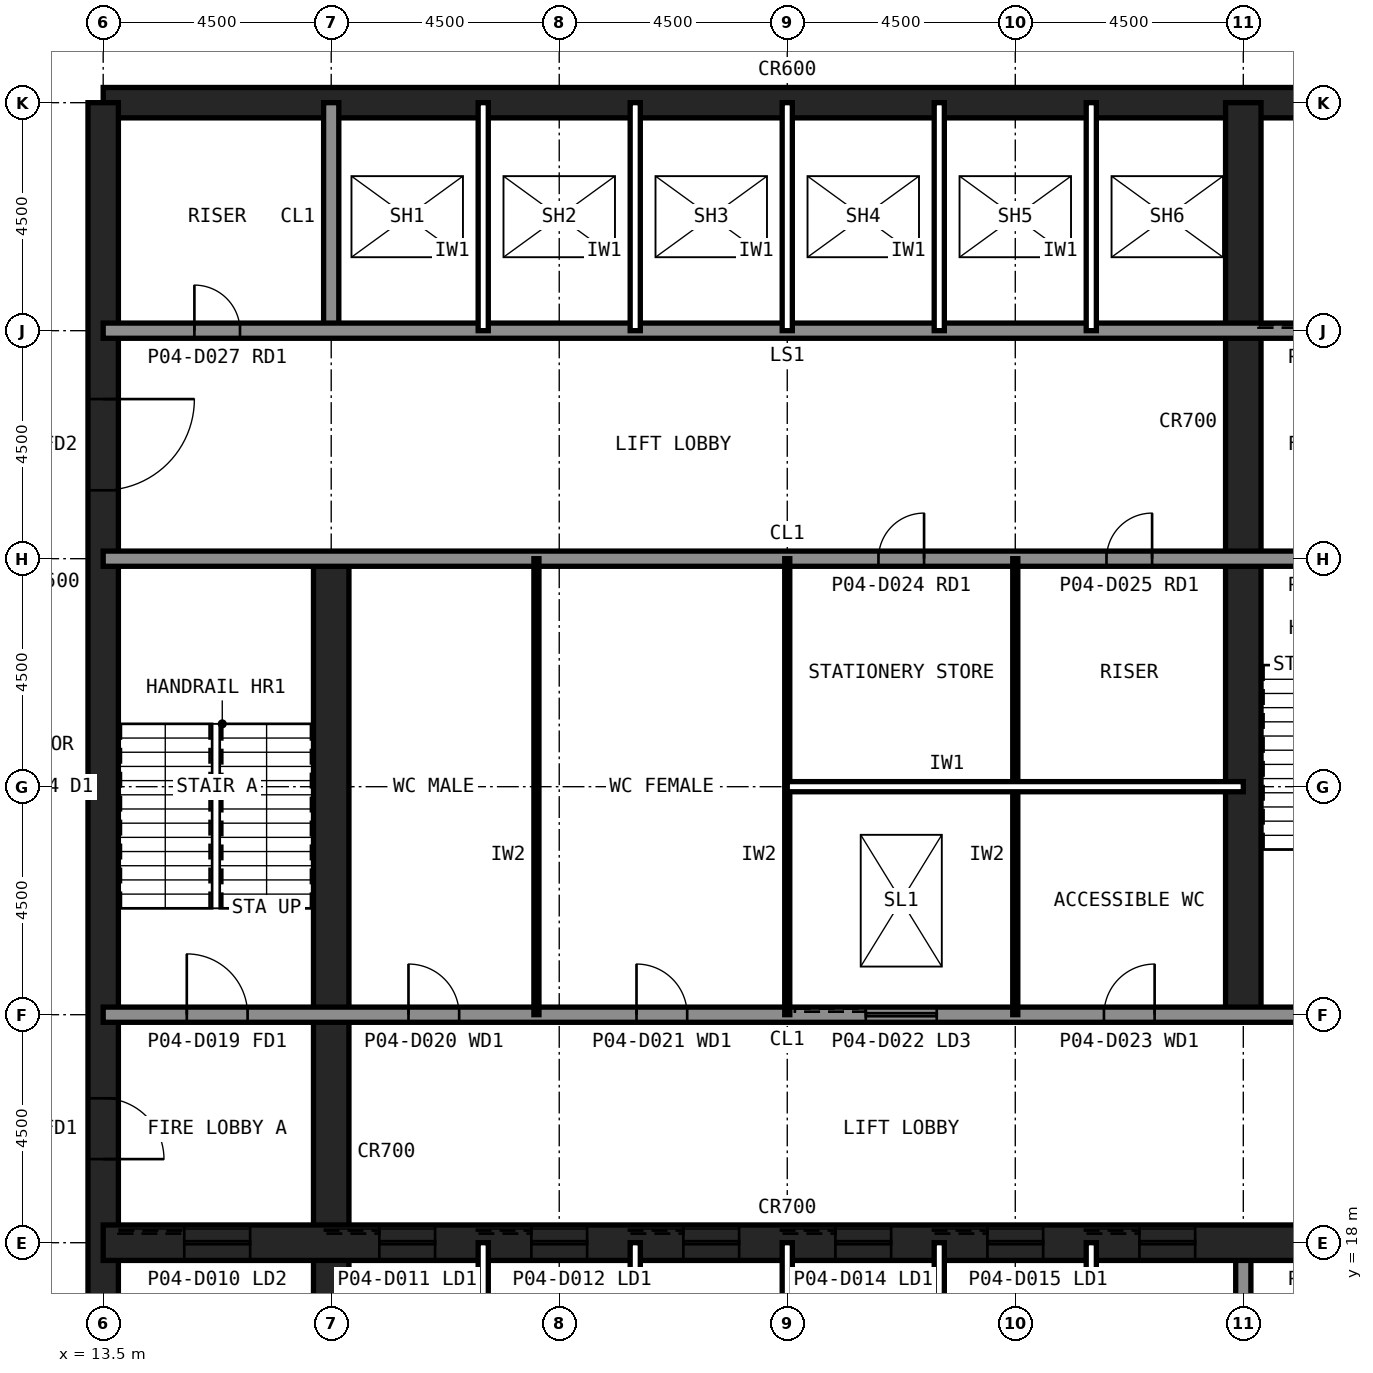
"""IFC4 building model, lengths in metres.
Left out: names, types, materials, properties, quantities, classifications, styles, units other than length and angle.
Written with IfcOpenShell. Run it as: python <this file> out.ifc"""

import sys

from ifc_helpers import new_model, si_unit, direction, frame, frame_2d, origin, place, context, subcontext, project, spatial, rectangle, extrude, element, fill, save


model = new_model("IFC4")
c1 = context("Model", 3, precision=1e-05, world=origin(), true_north=direction((0.0, 1.0)))
c2 = subcontext(c1, "Body", "Model", "MODEL_VIEW")
j1 = project(units=[si_unit("LENGTHUNIT", "METRE"), si_unit("PLANEANGLEUNIT", "RADIAN")], contexts=[c1])
p1 = place(None, origin())
s1 = spatial("IfcSite", under=j1, at=p1, CompositionType="ELEMENT")
p2 = place(p1, origin())
s2 = spatial("IfcBuilding", under=s1, at=p2, CompositionType="ELEMENT")
p3 = place(p2, frame((0.0, 0.0, 18.0)))
s3 = spatial("IfcBuildingStorey", under=s2, at=p3, CompositionType="ELEMENT", Elevation=18.0)
p4 = place(p3, frame((40.5, 40.5, 0.0), z_axis=(0.0, 0.0, 1.0), x_axis=(-1.0, 0.0, 0.0)))
e1 = element("IfcWall", 1, at=p4, inside=s3, PredefinedType="SHEAR", context=c2, shape_type="SweptSolid", body=[
    extrude(rectangle(XDim=27.0, YDim=0.6, at=frame_2d((13.5, 0.0))), origin(), (0.0, 0.0, 1.0), 5.0),
])
p5 = place(p3, frame((13.5, 40.5, 0.0), z_axis=(0.0, 0.0, 1.0), x_axis=(0.0, -1.0, 0.0)))
e2 = element("IfcWall", 2, at=p5, inside=s3, PredefinedType="SHEAR", context=c2, shape_type="SweptSolid", body=[
    extrude(rectangle(XDim=27.0, YDim=0.6, at=frame_2d((13.5, 0.0))), origin(), (0.0, 0.0, 1.0), 5.0),
])
p6 = place(p5, frame((19.65, 0.0, 0.0)))
e3 = element("IfcOpeningElement", 3, at=p6, cuts=e2, PredefinedType="OPENING", context=c2, shape_type="SweptSolid", body=[
    extrude(rectangle(XDim=1.2, YDim=2.1, at=frame_2d((0.6, 1.05))), frame((0.0, 0.31, 0.0), z_axis=(0.0, -1.0, 0.0), x_axis=(1.0, 0.0, 0.0)), (0.0, 0.0, 1.0), 0.62),
])
p7 = place(p5, frame((5.85, 0.0, 0.0)))
e4 = element("IfcOpeningElement", 4, at=p7, cuts=e2, PredefinedType="OPENING", context=c2, shape_type="SweptSolid", body=[
    extrude(rectangle(XDim=1.8, YDim=2.1, at=frame_2d((0.9, 1.05))), frame((0.0, 0.31, 0.0), z_axis=(0.0, -1.0, 0.0), x_axis=(1.0, 0.0, 0.0)), (0.0, 0.0, 1.0), 0.62),
])
p8 = place(p3, frame((18.0, 13.5, 0.0), z_axis=(0.0, 0.0, 1.0), x_axis=(0.0, 1.0, 0.0)))
e5 = element("IfcWall", 5, at=p8, inside=s3, PredefinedType="SHEAR", context=c2, shape_type="SweptSolid", body=[
    extrude(rectangle(XDim=18.0, YDim=0.7, at=frame_2d((9.0, 0.0))), origin(), (0.0, 0.0, 1.0), 5.0),
])
for number, where, z_axis, x_axis in (
    (6, (18.0, 36.0, 0.0), (0.0, 0.0, 1.0), (0.0, 1.0, 0.0)),
    (7, (36.0, 13.5, 0.0), (0.0, 0.0, 1.0), (0.0, 1.0, 0.0)),
):
    element("IfcWall", number, at=place(p3, frame(where, z_axis=z_axis, x_axis=x_axis)), inside=s3, PredefinedType="SOLIDWALL", context=c2, shape_type="SweptSolid", body=[
        extrude(rectangle(XDim=4.5, YDim=0.3, at=frame_2d((2.25, 0.0))), origin(), (0.0, 0.0, 1.0), 4.8),
    ])
p9 = place(p3, frame((36.0, 22.5, 0.0), z_axis=(0.0, 0.0, 1.0), x_axis=(0.0, 1.0, 0.0)))
e8 = element("IfcWall", 8, at=p9, inside=s3, PredefinedType="SHEAR", context=c2, shape_type="SweptSolid", body=[
    extrude(rectangle(XDim=18.0, YDim=0.7, at=frame_2d((9.0, 0.0))), origin(), (0.0, 0.0, 1.0), 5.0),
])
p10 = place(p3, frame((13.5, 18.0, 0.0), z_axis=(0.0, 0.0, 1.0), x_axis=(1.0, 0.0, 0.0)))
e9 = element("IfcWall", 9, at=p10, inside=s3, PredefinedType="SHEAR", context=c2, shape_type="SweptSolid", body=[
    extrude(rectangle(XDim=27.0, YDim=0.7, at=frame_2d((13.5, 0.0))), origin(), (0.0, 0.0, 1.0), 5.0),
])
p11 = place(p10, frame((24.3, 0.0, 0.0)))
e10 = element("IfcOpeningElement", 10, at=p11, cuts=e9, PredefinedType="OPENING", context=c2, shape_type="SweptSolid", body=[
    extrude(rectangle(XDim=0.9, YDim=2.1, at=frame_2d((0.45, 1.05))), frame((0.0, 0.36, 0.0), z_axis=(0.0, -1.0, 0.0), x_axis=(1.0, 0.0, 0.0)), (0.0, 0.0, 1.0), 0.72),
])
p12 = place(p10, frame((5.45, 0.0, 0.0)))
e11 = element("IfcOpeningElement", 11, at=p12, cuts=e9, PredefinedType="OPENING", context=c2, shape_type="SweptSolid", body=[
    extrude(rectangle(XDim=1.1, YDim=2.1, at=frame_2d((0.55, 1.05))), frame((0.0, 0.36, 0.0), z_axis=(0.0, -1.0, 0.0), x_axis=(1.0, 0.0, 0.0)), (0.0, 0.0, 1.0), 0.72),
])
p13 = place(p10, frame((8.45, 0.0, 0.0)))
e12 = element("IfcOpeningElement", 12, at=p13, cuts=e9, PredefinedType="OPENING", context=c2, shape_type="SweptSolid", body=[
    extrude(rectangle(XDim=1.1, YDim=2.1, at=frame_2d((0.55, 1.05))), frame((0.0, 0.36, 0.0), z_axis=(0.0, -1.0, 0.0), x_axis=(1.0, 0.0, 0.0)), (0.0, 0.0, 1.0), 0.72),
])
p14 = place(p10, frame((11.45, 0.0, 0.0)))
e13 = element("IfcOpeningElement", 13, at=p14, cuts=e9, PredefinedType="OPENING", context=c2, shape_type="SweptSolid", body=[
    extrude(rectangle(XDim=1.1, YDim=2.1, at=frame_2d((0.55, 1.05))), frame((0.0, 0.36, 0.0), z_axis=(0.0, -1.0, 0.0), x_axis=(1.0, 0.0, 0.0)), (0.0, 0.0, 1.0), 0.72),
])
p15 = place(p10, frame((14.45, 0.0, 0.0)))
e14 = element("IfcOpeningElement", 14, at=p15, cuts=e9, PredefinedType="OPENING", context=c2, shape_type="SweptSolid", body=[
    extrude(rectangle(XDim=1.1, YDim=2.1, at=frame_2d((0.55, 1.05))), frame((0.0, 0.36, 0.0), z_axis=(0.0, -1.0, 0.0), x_axis=(1.0, 0.0, 0.0)), (0.0, 0.0, 1.0), 0.72),
])
p16 = place(p10, frame((17.45, 0.0, 0.0)))
e15 = element("IfcOpeningElement", 15, at=p16, cuts=e9, PredefinedType="OPENING", context=c2, shape_type="SweptSolid", body=[
    extrude(rectangle(XDim=1.1, YDim=2.1, at=frame_2d((0.55, 1.05))), frame((0.0, 0.36, 0.0), z_axis=(0.0, -1.0, 0.0), x_axis=(1.0, 0.0, 0.0)), (0.0, 0.0, 1.0), 0.72),
])
p17 = place(p10, frame((20.45, 0.0, 0.0)))
e16 = element("IfcOpeningElement", 16, at=p17, cuts=e9, PredefinedType="OPENING", context=c2, shape_type="SweptSolid", body=[
    extrude(rectangle(XDim=1.1, YDim=2.1, at=frame_2d((0.55, 1.05))), frame((0.0, 0.36, 0.0), z_axis=(0.0, -1.0, 0.0), x_axis=(1.0, 0.0, 0.0)), (0.0, 0.0, 1.0), 0.72),
])
p18 = place(p10, frame((1.6, 0.0, 0.0)))
e17 = element("IfcOpeningElement", 17, at=p18, cuts=e9, PredefinedType="OPENING", context=c2, shape_type="SweptSolid", body=[
    extrude(rectangle(XDim=1.3, YDim=2.2, at=frame_2d((0.65, 1.1))), frame((0.0, 0.36, 0.0), z_axis=(0.0, -1.0, 0.0), x_axis=(1.0, 0.0, 0.0)), (0.0, 0.0, 1.0), 0.72),
])
p19 = place(p3, frame((13.5, 36.0, 0.0), z_axis=(0.0, 0.0, 1.0), x_axis=(1.0, 0.0, 0.0)))
e18 = element("IfcWall", 18, at=p19, inside=s3, PredefinedType="SOLIDWALL", context=c2, shape_type="SweptSolid", body=[
    extrude(rectangle(XDim=27.0, YDim=0.3, at=frame_2d((13.5, 0.0))), origin(), (0.0, 0.0, 1.0), 4.8),
])
p20 = place(p19, frame((1.8, 0.0, 0.0)))
e19 = element("IfcOpeningElement", 19, at=p20, cuts=e18, PredefinedType="OPENING", context=c2, shape_type="SweptSolid", body=[
    extrude(rectangle(XDim=0.9, YDim=2.1, at=frame_2d((0.45, 1.05))), frame((0.0, 0.16, 0.0), z_axis=(0.0, -1.0, 0.0), x_axis=(1.0, 0.0, 0.0)), (0.0, 0.0, 1.0), 0.32),
])
p21 = place(p19, frame((24.1, 0.0, 0.0)))
e20 = element("IfcOpeningElement", 20, at=p21, cuts=e18, PredefinedType="OPENING", context=c2, shape_type="SweptSolid", body=[
    extrude(rectangle(XDim=1.3, YDim=2.2, at=frame_2d((0.65, 1.1))), frame((0.0, 0.16, 0.0), z_axis=(0.0, -1.0, 0.0), x_axis=(1.0, 0.0, 0.0)), (0.0, 0.0, 1.0), 0.32),
])
p22 = place(p3, frame((13.5, 22.5, 0.0), z_axis=(0.0, 0.0, 1.0), x_axis=(1.0, 0.0, 0.0)))
e21 = element("IfcWall", 21, at=p22, inside=s3, PredefinedType="SOLIDWALL", context=c2, shape_type="SweptSolid", body=[
    extrude(rectangle(XDim=27.0, YDim=0.3, at=frame_2d((13.5, 0.0))), origin(), (0.0, 0.0, 1.0), 4.8),
])
p23 = place(p22, frame((1.65, 0.0, 0.0)))
e22 = element("IfcOpeningElement", 22, at=p23, cuts=e21, PredefinedType="OPENING", context=c2, shape_type="SweptSolid", body=[
    extrude(rectangle(XDim=1.2, YDim=2.1, at=frame_2d((0.6, 1.05))), frame((0.0, 0.16, 0.0), z_axis=(0.0, -1.0, 0.0), x_axis=(1.0, 0.0, 0.0)), (0.0, 0.0, 1.0), 0.32),
])
p24 = place(p22, frame((6.025, 0.0, 0.0)))
e23 = element("IfcOpeningElement", 23, at=p24, cuts=e21, PredefinedType="OPENING", context=c2, shape_type="SweptSolid", body=[
    extrude(rectangle(XDim=1.0, YDim=2.1, at=frame_2d((0.5, 1.05))), frame((0.0, 0.16, 0.0), z_axis=(0.0, -1.0, 0.0), x_axis=(1.0, 0.0, 0.0)), (0.0, 0.0, 1.0), 0.32),
])
p25 = place(p22, frame((10.525, 0.0, 0.0)))
e24 = element("IfcOpeningElement", 24, at=p25, cuts=e21, PredefinedType="OPENING", context=c2, shape_type="SweptSolid", body=[
    extrude(rectangle(XDim=1.0, YDim=2.1, at=frame_2d((0.5, 1.05))), frame((0.0, 0.16, 0.0), z_axis=(0.0, -1.0, 0.0), x_axis=(1.0, 0.0, 0.0)), (0.0, 0.0, 1.0), 0.32),
])
p26 = place(p22, frame((19.75, 0.0, 0.0)))
e25 = element("IfcOpeningElement", 25, at=p26, cuts=e21, PredefinedType="OPENING", context=c2, shape_type="SweptSolid", body=[
    extrude(rectangle(XDim=1.0, YDim=2.1, at=frame_2d((0.5, 1.05))), frame((0.0, 0.16, 0.0), z_axis=(0.0, -1.0, 0.0), x_axis=(1.0, 0.0, 0.0)), (0.0, 0.0, 1.0), 0.32),
])
p27 = place(p22, frame((15.05, 0.0, 0.0)))
e26 = element("IfcOpeningElement", 26, at=p27, cuts=e21, PredefinedType="OPENING", context=c2, shape_type="SweptSolid", body=[
    extrude(rectangle(XDim=1.4, YDim=2.4, at=frame_2d((0.7, 1.2))), frame((0.0, 0.16, 0.0), z_axis=(0.0, -1.0, 0.0), x_axis=(1.0, 0.0, 0.0)), (0.0, 0.0, 1.0), 0.32),
])
p28 = place(p3, frame((13.5, 31.5, 0.0), z_axis=(0.0, 0.0, 1.0), x_axis=(1.0, 0.0, 0.0)))
e27 = element("IfcWall", 27, at=p28, inside=s3, PredefinedType="SOLIDWALL", context=c2, shape_type="SweptSolid", body=[
    extrude(rectangle(XDim=27.0, YDim=0.3, at=frame_2d((13.5, 0.0))), origin(), (0.0, 0.0, 1.0), 4.8),
])
p29 = place(p28, frame((24.15, 0.0, 0.0)))
e28 = element("IfcOpeningElement", 28, at=p29, cuts=e27, PredefinedType="OPENING", context=c2, shape_type="SweptSolid", body=[
    extrude(rectangle(XDim=1.2, YDim=2.1, at=frame_2d((0.6, 1.05))), frame((0.0, 0.16, 0.0), z_axis=(0.0, -1.0, 0.0), x_axis=(1.0, 0.0, 0.0)), (0.0, 0.0, 1.0), 0.32),
])
p30 = place(p28, frame((15.3, 0.0, 0.0)))
e29 = element("IfcOpeningElement", 29, at=p30, cuts=e27, PredefinedType="OPENING", context=c2, shape_type="SweptSolid", body=[
    extrude(rectangle(XDim=0.9, YDim=2.1, at=frame_2d((0.45, 1.05))), frame((0.0, 0.16, 0.0), z_axis=(0.0, -1.0, 0.0), x_axis=(1.0, 0.0, 0.0)), (0.0, 0.0, 1.0), 0.32),
])
p31 = place(p28, frame((19.8, 0.0, 0.0)))
e30 = element("IfcOpeningElement", 30, at=p31, cuts=e27, PredefinedType="OPENING", context=c2, shape_type="SweptSolid", body=[
    extrude(rectangle(XDim=0.9, YDim=2.1, at=frame_2d((0.45, 1.05))), frame((0.0, 0.16, 0.0), z_axis=(0.0, -1.0, 0.0), x_axis=(1.0, 0.0, 0.0)), (0.0, 0.0, 1.0), 0.32),
])
for number, where, z_axis, x_axis in (
    (31, (21.0, 13.5, 0.0), (0.0, 0.0, 1.0), (0.0, 1.0, 0.0)),
    (32, (21.0, 36.0, 0.0), (0.0, 0.0, 1.0), (0.0, 1.0, 0.0)),
    (33, (24.0, 13.5, 0.0), (0.0, 0.0, 1.0), (0.0, 1.0, 0.0)),
    (34, (24.0, 36.0, 0.0), (0.0, 0.0, 1.0), (0.0, 1.0, 0.0)),
    (35, (27.0, 13.5, 0.0), (0.0, 0.0, 1.0), (0.0, 1.0, 0.0)),
    (36, (27.0, 36.0, 0.0), (0.0, 0.0, 1.0), (0.0, 1.0, 0.0)),
    (37, (30.0, 13.5, 0.0), (0.0, 0.0, 1.0), (0.0, 1.0, 0.0)),
    (38, (30.0, 36.0, 0.0), (0.0, 0.0, 1.0), (0.0, 1.0, 0.0)),
    (39, (33.0, 13.5, 0.0), (0.0, 0.0, 1.0), (0.0, 1.0, 0.0)),
    (40, (33.0, 36.0, 0.0), (0.0, 0.0, 1.0), (0.0, 1.0, 0.0)),
):
    element("IfcWall", number, at=place(p3, frame(where, z_axis=z_axis, x_axis=x_axis)), inside=s3, PredefinedType="PARTITIONING", context=c2, shape_type="SweptSolid", body=[
        extrude(rectangle(XDim=4.5, YDim=0.2, at=frame_2d((2.25, 0.0))), origin(), (0.0, 0.0, 1.0), 4.8),
    ])
for number, where, z_axis, x_axis in (
    (41, (22.05, 22.5, 0.0), (0.0, 0.0, 1.0), (0.0, 1.0, 0.0)),
    (42, (27.0, 22.5, 0.0), (0.0, 0.0, 1.0), (0.0, 1.0, 0.0)),
    (43, (31.5, 22.5, 0.0), (0.0, 0.0, 1.0), (0.0, 1.0, 0.0)),
):
    element("IfcWall", number, at=place(p3, frame(where, z_axis=z_axis, x_axis=x_axis)), inside=s3, PredefinedType="PLUMBINGWALL", context=c2, shape_type="SweptSolid", body=[
        extrude(rectangle(XDim=9.0, YDim=0.1, at=frame_2d((4.5, 0.0))), origin(), (0.0, 0.0, 1.0), 4.8),
    ])
p32 = place(p3, frame((27.0, 27.0, 0.0), z_axis=(0.0, 0.0, 1.0), x_axis=(1.0, 0.0, 0.0)))
e44 = element("IfcWall", 44, at=p32, inside=s3, PredefinedType="PARTITIONING", context=c2, shape_type="SweptSolid", body=[
    extrude(rectangle(XDim=9.0, YDim=0.2, at=frame_2d((4.5, 0.0))), origin(), (0.0, 0.0, 1.0), 4.8),
])
p33 = place(p6, origin())
e45 = element("IfcDoor", 45, at=p33, inside=s3, OperationType="SINGLE_SWING_RIGHT", PredefinedType="DOOR", context=c2, shape_type="SweptSolid", body=[
    extrude(rectangle(XDim=1.2, YDim=2.1, at=frame_2d((0.6, 1.05))), frame((0.0, 0.025, 0.0), z_axis=(0.0, -1.0, 0.0), x_axis=(1.0, 0.0, 0.0)), (0.0, 0.0, 1.0), 0.05),
])
fill(e3, e45)
p34 = place(p7, origin())
e46 = element("IfcDoor", 46, at=p34, inside=s3, OperationType="SINGLE_SWING_LEFT", PredefinedType="DOOR", context=c2, shape_type="SweptSolid", body=[
    extrude(rectangle(XDim=1.8, YDim=2.1, at=frame_2d((0.9, 1.05))), frame((0.0, 0.025, 0.0), z_axis=(0.0, -1.0, 0.0), x_axis=(1.0, 0.0, 0.0)), (0.0, 0.0, 1.0), 0.05),
])
fill(e4, e46)
p35 = place(p23, origin())
e47 = element("IfcDoor", 47, at=p35, inside=s3, OperationType="SINGLE_SWING_LEFT", PredefinedType="DOOR", context=c2, shape_type="SweptSolid", body=[
    extrude(rectangle(XDim=1.2, YDim=2.1, at=frame_2d((0.6, 1.05))), frame((0.0, 0.025, 0.0), z_axis=(0.0, -1.0, 0.0), x_axis=(1.0, 0.0, 0.0)), (0.0, 0.0, 1.0), 0.05),
])
fill(e22, e47)
p36 = place(p24, origin())
e48 = element("IfcDoor", 48, at=p36, inside=s3, OperationType="SINGLE_SWING_LEFT", PredefinedType="DOOR", context=c2, shape_type="SweptSolid", body=[
    extrude(rectangle(XDim=1.0, YDim=2.1, at=frame_2d((0.5, 1.05))), frame((0.0, 0.025, 0.0), z_axis=(0.0, -1.0, 0.0), x_axis=(1.0, 0.0, 0.0)), (0.0, 0.0, 1.0), 0.05),
])
fill(e23, e48)
p37 = place(p25, origin())
e49 = element("IfcDoor", 49, at=p37, inside=s3, OperationType="SINGLE_SWING_LEFT", PredefinedType="DOOR", context=c2, shape_type="SweptSolid", body=[
    extrude(rectangle(XDim=1.0, YDim=2.1, at=frame_2d((0.5, 1.05))), frame((0.0, 0.025, 0.0), z_axis=(0.0, -1.0, 0.0), x_axis=(1.0, 0.0, 0.0)), (0.0, 0.0, 1.0), 0.05),
])
fill(e24, e49)
p38 = place(p26, origin())
e50 = element("IfcDoor", 50, at=p38, inside=s3, OperationType="SINGLE_SWING_RIGHT", PredefinedType="DOOR", context=c2, shape_type="SweptSolid", body=[
    extrude(rectangle(XDim=1.0, YDim=2.1, at=frame_2d((0.5, 1.05))), frame((0.0, 0.025, 0.0), z_axis=(0.0, -1.0, 0.0), x_axis=(1.0, 0.0, 0.0)), (0.0, 0.0, 1.0), 0.05),
])
fill(e25, e50)
p39 = place(p30, origin())
e51 = element("IfcDoor", 51, at=p39, inside=s3, OperationType="SINGLE_SWING_RIGHT", PredefinedType="DOOR", context=c2, shape_type="SweptSolid", body=[
    extrude(rectangle(XDim=0.9, YDim=2.1, at=frame_2d((0.45, 1.05))), frame((0.0, 0.025, 0.0), z_axis=(0.0, -1.0, 0.0), x_axis=(1.0, 0.0, 0.0)), (0.0, 0.0, 1.0), 0.05),
])
fill(e29, e51)
p40 = place(p31, origin())
e52 = element("IfcDoor", 52, at=p40, inside=s3, OperationType="SINGLE_SWING_RIGHT", PredefinedType="DOOR", context=c2, shape_type="SweptSolid", body=[
    extrude(rectangle(XDim=0.9, YDim=2.1, at=frame_2d((0.45, 1.05))), frame((0.0, 0.025, 0.0), z_axis=(0.0, -1.0, 0.0), x_axis=(1.0, 0.0, 0.0)), (0.0, 0.0, 1.0), 0.05),
])
fill(e30, e52)
p41 = place(p20, origin())
e53 = element("IfcDoor", 53, at=p41, inside=s3, OperationType="SINGLE_SWING_LEFT", PredefinedType="DOOR", context=c2, shape_type="SweptSolid", body=[
    extrude(rectangle(XDim=0.9, YDim=2.1, at=frame_2d((0.45, 1.05))), frame((0.0, 0.025, 0.0), z_axis=(0.0, -1.0, 0.0), x_axis=(1.0, 0.0, 0.0)), (0.0, 0.0, 1.0), 0.05),
])
fill(e19, e53)
p42 = place(p12, origin())
e54 = element("IfcDoor", 54, at=p42, inside=s3, OperationType="SLIDING_TO_LEFT", PredefinedType="DOOR", context=c2, shape_type="SweptSolid", body=[
    extrude(rectangle(XDim=1.1, YDim=2.1, at=frame_2d((0.55, 1.05))), frame((0.0, 0.025, 0.0), z_axis=(0.0, -1.0, 0.0), x_axis=(1.0, 0.0, 0.0)), (0.0, 0.0, 1.0), 0.05),
])
fill(e11, e54)
p43 = place(p13, origin())
e55 = element("IfcDoor", 55, at=p43, inside=s3, OperationType="SLIDING_TO_LEFT", PredefinedType="DOOR", context=c2, shape_type="SweptSolid", body=[
    extrude(rectangle(XDim=1.1, YDim=2.1, at=frame_2d((0.55, 1.05))), frame((0.0, 0.025, 0.0), z_axis=(0.0, -1.0, 0.0), x_axis=(1.0, 0.0, 0.0)), (0.0, 0.0, 1.0), 0.05),
])
fill(e12, e55)
p44 = place(p14, origin())
e56 = element("IfcDoor", 56, at=p44, inside=s3, OperationType="SLIDING_TO_LEFT", PredefinedType="DOOR", context=c2, shape_type="SweptSolid", body=[
    extrude(rectangle(XDim=1.1, YDim=2.1, at=frame_2d((0.55, 1.05))), frame((0.0, 0.025, 0.0), z_axis=(0.0, -1.0, 0.0), x_axis=(1.0, 0.0, 0.0)), (0.0, 0.0, 1.0), 0.05),
])
fill(e13, e56)
p45 = place(p15, origin())
e57 = element("IfcDoor", 57, at=p45, inside=s3, OperationType="SLIDING_TO_LEFT", PredefinedType="DOOR", context=c2, shape_type="SweptSolid", body=[
    extrude(rectangle(XDim=1.1, YDim=2.1, at=frame_2d((0.55, 1.05))), frame((0.0, 0.025, 0.0), z_axis=(0.0, -1.0, 0.0), x_axis=(1.0, 0.0, 0.0)), (0.0, 0.0, 1.0), 0.05),
])
fill(e14, e57)
p46 = place(p16, origin())
e58 = element("IfcDoor", 58, at=p46, inside=s3, OperationType="SLIDING_TO_LEFT", PredefinedType="DOOR", context=c2, shape_type="SweptSolid", body=[
    extrude(rectangle(XDim=1.1, YDim=2.1, at=frame_2d((0.55, 1.05))), frame((0.0, 0.025, 0.0), z_axis=(0.0, -1.0, 0.0), x_axis=(1.0, 0.0, 0.0)), (0.0, 0.0, 1.0), 0.05),
])
fill(e15, e58)
p47 = place(p17, origin())
e59 = element("IfcDoor", 59, at=p47, inside=s3, OperationType="SLIDING_TO_LEFT", PredefinedType="DOOR", context=c2, shape_type="SweptSolid", body=[
    extrude(rectangle(XDim=1.1, YDim=2.1, at=frame_2d((0.55, 1.05))), frame((0.0, 0.025, 0.0), z_axis=(0.0, -1.0, 0.0), x_axis=(1.0, 0.0, 0.0)), (0.0, 0.0, 1.0), 0.05),
])
fill(e16, e59)
p48 = place(p18, origin())
e60 = element("IfcDoor", 60, at=p48, inside=s3, OperationType="SLIDING_TO_LEFT", PredefinedType="DOOR", context=c2, shape_type="SweptSolid", body=[
    extrude(rectangle(XDim=1.3, YDim=2.2, at=frame_2d((0.65, 1.1))), frame((0.0, 0.025, 0.0), z_axis=(0.0, -1.0, 0.0), x_axis=(1.0, 0.0, 0.0)), (0.0, 0.0, 1.0), 0.05),
])
fill(e17, e60)
p49 = place(p27, origin())
e61 = element("IfcDoor", 61, at=p49, inside=s3, OperationType="SLIDING_TO_LEFT", PredefinedType="DOOR", context=c2, shape_type="SweptSolid", body=[
    extrude(rectangle(XDim=1.4, YDim=2.4, at=frame_2d((0.7, 1.2))), frame((0.0, 0.025, 0.0), z_axis=(0.0, -1.0, 0.0), x_axis=(1.0, 0.0, 0.0)), (0.0, 0.0, 1.0), 0.05),
])
fill(e26, e61)
save(model, sys.argv[1])
